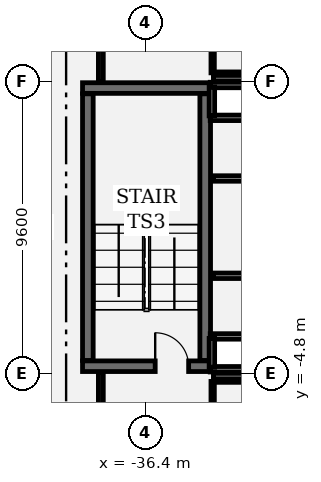
"""IFC4 building model, lengths in metres.
Left out: names, types, materials, properties, quantities, classifications, styles, units other than length and angle.
Written with IfcOpenShell. Run it as: python <this file> out.ifc"""

import sys

from ifc_helpers import new_model, si_unit, direction, frame, frame_2d, origin, place, context, subcontext, project, spatial, rectangle, extrude, element, fill, save


model = new_model("IFC4")
c1 = context("Model", 3, precision=1e-05, world=origin(), true_north=direction((0.0, 1.0)))
c2 = subcontext(c1, "Body", "Model", "MODEL_VIEW")
j1 = project(units=[si_unit("LENGTHUNIT", "METRE"), si_unit("PLANEANGLEUNIT", "RADIAN")], contexts=[c1])
p1 = place(None, origin())
s1 = spatial("IfcSite", under=j1, at=p1, CompositionType="ELEMENT")
p2 = place(p1, origin())
s2 = spatial("IfcBuilding", under=s1, at=p2, CompositionType="ELEMENT")
p3 = place(p2, frame((0.0, 0.0, 134.1)))
s3 = spatial("IfcBuildingStorey", under=s2, at=p3, CompositionType="ELEMENT", Elevation=134.1)
p4 = place(p3, frame((-38.46, -4.575, 0.0), z_axis=(0.0, 0.0, 1.0), x_axis=(1.0, 0.0, 0.0)))
e1 = element("IfcWall", 1, at=p4, inside=s3, PredefinedType="SHEAR", context=c2, shape_type="SweptSolid", body=[
    extrude(rectangle(XDim=4.21, YDim=0.35, at=frame_2d((2.105, 0.0))), origin(), (0.0, 0.0, 1.0), 3.78),
])
p5 = place(p4, frame((2.39, 0.0, 0.0)))
e2 = element("IfcOpeningElement", 2, at=p5, cuts=e1, PredefinedType="OPENING", context=c2, shape_type="SweptSolid", body=[
    extrude(rectangle(XDim=1.1, YDim=2.2, at=frame_2d((0.55, 1.1))), frame((0.0, 0.185, 0.0), z_axis=(0.0, -1.0, 0.0), x_axis=(1.0, 0.0, 0.0)), (0.0, 0.0, 1.0), 0.37),
])
p6 = place(p3, frame((-34.25, 4.575, 0.0), z_axis=(0.0, 0.0, 1.0), x_axis=(-1.0, 0.0, 0.0)))
e3 = element("IfcWall", 3, at=p6, inside=s3, PredefinedType="SHEAR", context=c2, shape_type="SweptSolid", body=[
    extrude(rectangle(XDim=4.21, YDim=0.35, at=frame_2d((2.105, 0.0))), origin(), (0.0, 0.0, 1.0), 3.78),
])
for number, where, z_axis, x_axis in (
    (4, (-34.425, -4.385, 0.0), (0.0, 0.0, 1.0), (0.0, 1.0, 0.0)),
    (5, (-38.285, 4.385, 0.0), (0.0, 0.0, 1.0), (0.0, -1.0, 0.0)),
):
    element("IfcWall", number, at=place(p3, frame(where, z_axis=z_axis, x_axis=x_axis)), inside=s3, PredefinedType="SHEAR", context=c2, shape_type="SweptSolid", body=[
        extrude(rectangle(XDim=8.77, YDim=0.35, at=frame_2d((4.385, 0.0))), origin(), (0.0, 0.0, 1.0), 3.78),
    ])
for number, where, z_axis, x_axis in (
    (6, (-32.99, 3.595, 0.0), (0.0, 0.0, 1.0), (-1.0, 0.0, 0.0)),
    (7, (-34.26, 4.675, 0.0), (0.0, 0.0, 1.0), (1.0, 0.0, 0.0)),
):
    element("IfcWall", number, at=place(p3, frame(where, z_axis=z_axis, x_axis=x_axis)), inside=s3, PredefinedType="PARTITIONING", context=c2, shape_type="SweptSolid", body=[
        extrude(rectangle(XDim=1.27, YDim=0.18, at=frame_2d((0.635, 0.0))), origin(), (0.0, 0.0, 1.0), 3.78),
    ])
p7 = place(p3, frame((-34.205, 3.66, 0.0), z_axis=(0.0, 0.0, 1.0), x_axis=(0.0, 1.0, 0.0)))
e8 = element("IfcWall", 8, at=p7, inside=s3, PredefinedType="PARTITIONING", context=c2, shape_type="SweptSolid", body=[
    extrude(rectangle(XDim=0.95, YDim=0.18, at=frame_2d((0.475, 0.0))), origin(), (0.0, 0.0, 1.0), 3.78),
])
for number, where, z_axis, x_axis in (
    (9, (-32.99, -4.675, 0.0), (0.0, 0.0, 1.0), (-1.0, 0.0, 0.0)),
    (10, (-34.26, -3.595, 0.0), (0.0, 0.0, 1.0), (1.0, 0.0, 0.0)),
):
    element("IfcWall", number, at=place(p3, frame(where, z_axis=z_axis, x_axis=x_axis)), inside=s3, PredefinedType="PARTITIONING", context=c2, shape_type="SweptSolid", body=[
        extrude(rectangle(XDim=1.27, YDim=0.18, at=frame_2d((0.635, 0.0))), origin(), (0.0, 0.0, 1.0), 3.78),
    ])
p8 = place(p3, frame((-34.205, -4.61, 0.0), z_axis=(0.0, 0.0, 1.0), x_axis=(0.0, 1.0, 0.0)))
e11 = element("IfcWall", 11, at=p8, inside=s3, PredefinedType="PARTITIONING", context=c2, shape_type="SweptSolid", body=[
    extrude(rectangle(XDim=0.95, YDim=0.18, at=frame_2d((0.475, 0.0))), origin(), (0.0, 0.0, 1.0), 3.78),
])
p9 = place(p3, frame((-34.18, 8.225, 0.0), z_axis=(0.0, 0.0, 1.0), x_axis=(0.0, -1.0, 0.0)))
e12 = element("IfcWall", 12, at=p9, inside=s3, PredefinedType="PARTITIONING", context=c2, shape_type="SweptSolid", body=[
    extrude(rectangle(XDim=3.15, YDim=0.11, at=frame_2d((1.575, 0.0))), origin(), (0.0, 0.0, 1.0), 3.78),
])
p10 = place(p9, frame((1.135, 0.0, 0.0)))
e13 = element("IfcOpeningElement", 13, at=p10, cuts=e12, PredefinedType="OPENING", context=c2, shape_type="SweptSolid", body=[
    extrude(rectangle(XDim=0.88, YDim=2.1, at=frame_2d((0.44, 1.05))), frame((0.0, 0.065, 0.0), z_axis=(0.0, -1.0, 0.0), x_axis=(1.0, 0.0, 0.0)), (0.0, 0.0, 1.0), 0.13),
])
for number, where, z_axis, x_axis in (
    (14, (-34.155, 5.05, 0.0), (0.0, 0.0, 1.0), (1.0, 0.0, 0.0)),
    (15, (-31.09, -5.05, 0.0), (0.0, 0.0, 1.0), (-1.0, 0.0, 0.0)),
):
    element("IfcWall", number, at=place(p3, frame(where, z_axis=z_axis, x_axis=x_axis)), inside=s3, PredefinedType="PARTITIONING", context=c2, shape_type="SweptSolid", body=[
        extrude(rectangle(XDim=3.065, YDim=0.11, at=frame_2d((1.532, 0.0))), origin(), (0.0, 0.0, 1.0), 3.78),
    ])
p11 = place(p3, frame((-34.18, -5.075, 0.0), z_axis=(0.0, 0.0, 1.0), x_axis=(0.0, -1.0, 0.0)))
e16 = element("IfcWall", 16, at=p11, inside=s3, PredefinedType="PARTITIONING", context=c2, shape_type="SweptSolid", body=[
    extrude(rectangle(XDim=3.25, YDim=0.11, at=frame_2d((1.625, 0.0))), origin(), (0.0, 0.0, 1.0), 3.78),
])
p12 = place(p11, frame((1.185, 0.0, 0.0)))
e17 = element("IfcOpeningElement", 17, at=p12, cuts=e16, PredefinedType="OPENING", context=c2, shape_type="SweptSolid", body=[
    extrude(rectangle(XDim=0.88, YDim=2.1, at=frame_2d((0.44, 1.05))), frame((0.0, 0.065, 0.0), z_axis=(0.0, -1.0, 0.0), x_axis=(1.0, 0.0, 0.0)), (0.0, 0.0, 1.0), 0.13),
])
p13 = place(p3, frame((-34.155, 1.6, 0.0), z_axis=(0.0, 0.0, 1.0), x_axis=(1.0, 0.0, 0.0)))
e18 = element("IfcWall", 18, at=p13, inside=s3, PredefinedType="PARTITIONING", context=c2, shape_type="SweptSolid", body=[
    extrude(rectangle(XDim=3.25, YDim=0.18, at=frame_2d((1.625, 0.0))), origin(), (0.0, 0.0, 1.0), 3.78),
])
p14 = place(p13, frame((1.185, 0.0, 0.0)))
e19 = element("IfcOpeningElement", 19, at=p14, cuts=e18, PredefinedType="OPENING", context=c2, shape_type="SweptSolid", body=[
    extrude(rectangle(XDim=0.88, YDim=2.1, at=frame_2d((0.44, 1.05))), frame((0.0, 0.1, 0.0), z_axis=(0.0, -1.0, 0.0), x_axis=(1.0, 0.0, 0.0)), (0.0, 0.0, 1.0), 0.2),
])
for number, where, z_axis, x_axis in (
    (20, (-31.09, 4.9, 0.0), (0.0, 0.0, 1.0), (-1.0, 0.0, 0.0)),
    (21, (-34.155, -4.9, 0.0), (0.0, 0.0, 1.0), (1.0, 0.0, 0.0)),
):
    element("IfcWall", number, at=place(p3, frame(where, z_axis=z_axis, x_axis=x_axis)), inside=s3, PredefinedType="PARTITIONING", context=c2, shape_type="SweptSolid", body=[
        extrude(rectangle(XDim=3.065, YDim=0.18, at=frame_2d((1.532, 0.0))), origin(), (0.0, 0.0, 1.0), 3.78),
    ])
p15 = place(p3, frame((-30.905, -1.6, 0.0), z_axis=(0.0, 0.0, 1.0), x_axis=(-1.0, 0.0, 0.0)))
e22 = element("IfcWall", 22, at=p15, inside=s3, PredefinedType="PARTITIONING", context=c2, shape_type="SweptSolid", body=[
    extrude(rectangle(XDim=3.25, YDim=0.18, at=frame_2d((1.625, 0.0))), origin(), (0.0, 0.0, 1.0), 3.78),
])
p16 = place(p15, frame((1.185, 0.0, 0.0)))
e23 = element("IfcOpeningElement", 23, at=p16, cuts=e22, PredefinedType="OPENING", context=c2, shape_type="SweptSolid", body=[
    extrude(rectangle(XDim=0.88, YDim=2.1, at=frame_2d((0.44, 1.05))), frame((0.0, 0.1, 0.0), z_axis=(0.0, -1.0, 0.0), x_axis=(1.0, 0.0, 0.0)), (0.0, 0.0, 1.0), 0.2),
])
p17 = place(p3, frame((-37.858, -7.484, 0.0), z_axis=(0.0, 0.0, 1.0), x_axis=(0.0, 1.0, 0.0)))
e24 = element("IfcWall", 24, at=p17, inside=s3, PredefinedType="PARTITIONING", context=c2, shape_type="SweptSolid", body=[
    extrude(rectangle(XDim=2.701, YDim=0.16, at=frame_2d((1.35, 0.0))), origin(), (0.0, 0.0, 1.0), 3.78),
])
p18 = place(p3, frame((-37.858, 4.783, 0.0), z_axis=(0.0, 0.0, 1.0), x_axis=(0.0, 1.0, 0.0)))
e25 = element("IfcWall", 25, at=p18, inside=s3, PredefinedType="PARTITIONING", context=c2, shape_type="SweptSolid", body=[
    extrude(rectangle(XDim=5.95, YDim=0.16, at=frame_2d((2.975, 0.0))), origin(), (0.0, 0.0, 1.0), 3.78),
])
p19 = place(p5, origin())
e26 = element("IfcDoor", 26, at=p19, inside=s3, OperationType="SINGLE_SWING_LEFT", PredefinedType="DOOR", context=c2, shape_type="SweptSolid", body=[
    extrude(rectangle(XDim=1.1, YDim=2.2, at=frame_2d((0.55, 1.1))), frame((0.0, 0.025, 0.0), z_axis=(0.0, -1.0, 0.0), x_axis=(1.0, 0.0, 0.0)), (0.0, 0.0, 1.0), 0.05),
])
fill(e2, e26)
save(model, sys.argv[1])
